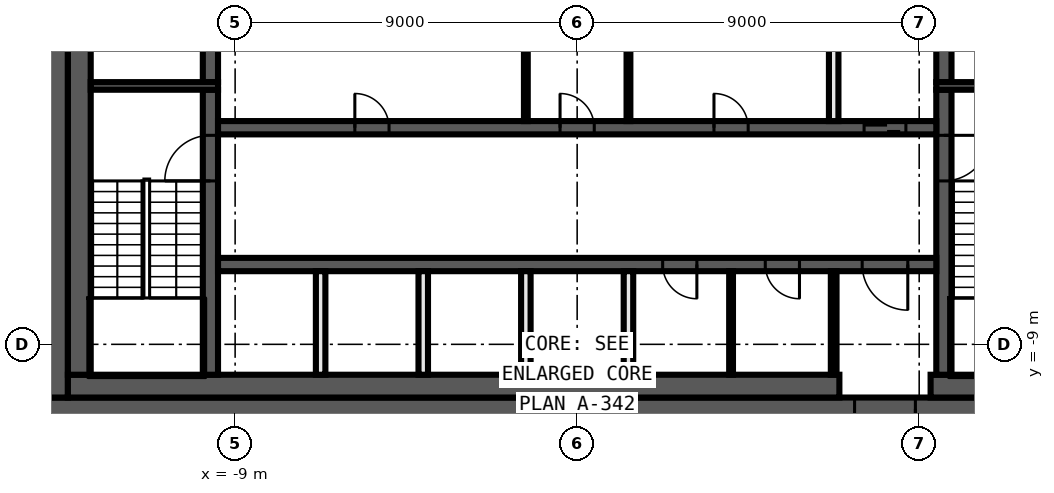
"""IFC4 building model, lengths in metres.
Left out: names, types, materials, properties, quantities, classifications, styles, units other than length and angle.
Written with IfcOpenShell. Run it as: python <this file> out.ifc"""

import sys

from ifc_helpers import new_model, si_unit, direction, frame, frame_2d, origin, place, context, subcontext, project, spatial, rectangle, extrude, element, fill, save


model = new_model("IFC4")
c1 = context("Model", 3, precision=1e-05, world=origin(), true_north=direction((0.0, 1.0)))
c2 = subcontext(c1, "Body", "Model", "MODEL_VIEW")
j1 = project(units=[si_unit("LENGTHUNIT", "METRE"), si_unit("PLANEANGLEUNIT", "RADIAN")], contexts=[c1])
p1 = place(None, origin())
s1 = spatial("IfcSite", under=j1, at=p1, CompositionType="ELEMENT")
p2 = place(p1, origin())
s2 = spatial("IfcBuilding", under=s1, at=p2, CompositionType="ELEMENT")
p3 = place(p2, frame((0.0, 0.0, 359.0)))
s3 = spatial("IfcBuildingStorey", under=s2, at=p3, CompositionType="ELEMENT", Elevation=359.0)
p4 = place(p3, frame((-11.138, 20.28, 0.0), z_axis=(0.0, 0.0, 1.0), x_axis=(-0.441342255748, -0.897338850876, 0.0)))
e1 = element("IfcWall", 1, at=p4, inside=s3, PredefinedType="SOLIDWALL", context=c2, shape_type="SweptSolid", body=[
    extrude(rectangle(XDim=28.805, YDim=0.25, at=frame_2d((14.403, 0.0))), origin(), (0.0, 0.0, 1.0), 3.8),
])
p5 = place(p3, frame((-23.851, -5.568, 0.0), z_axis=(0.0, 0.0, 1.0), x_axis=(0.701718568407, -0.712454244673, 0.0)))
e2 = element("IfcWall", 2, at=p5, inside=s3, PredefinedType="SOLIDWALL", context=c2, shape_type="SweptSolid", body=[
    extrude(rectangle(XDim=20.785, YDim=0.25, at=frame_2d((10.393, 0.0))), origin(), (0.0, 0.0, 1.0), 3.8),
])
p6 = place(p3, frame((14.0, -10.7, 0.0), z_axis=(0.0, 0.0, 1.0), x_axis=(-1.0, 0.0, 0.0)))
e3 = element("IfcWall", 3, at=p6, inside=s3, PredefinedType="SHEAR", context=c2, shape_type="SweptSolid", body=[
    extrude(rectangle(XDim=28.0, YDim=0.6, at=frame_2d((14.0, 0.0))), origin(), (0.0, 0.0, 1.0), 3.8),
])
p7 = place(p6, frame((5.1, 0.0, 0.0)))
e4 = element("IfcOpeningElement", 4, at=p7, cuts=e3, PredefinedType="OPENING", context=c2, shape_type="SweptSolid", body=[
    extrude(rectangle(XDim=1.6, YDim=2.1, at=frame_2d((0.8, 1.05))), frame((0.0, 0.31, 0.0), z_axis=(0.0, -1.0, 0.0), x_axis=(1.0, 0.0, 0.0)), (0.0, 0.0, 1.0), 0.62),
])
p8 = place(p3, frame((-13.7, -10.4, 0.0), z_axis=(0.0, 0.0, 1.0), x_axis=(0.0, 1.0, 0.0)))
e5 = element("IfcWall", 5, at=p8, inside=s3, PredefinedType="SHEAR", context=c2, shape_type="SweptSolid", body=[
    extrude(rectangle(XDim=20.8, YDim=0.6, at=frame_2d((10.4, 0.0))), origin(), (0.0, 0.0, 1.0), 3.8),
])
p9 = place(p3, frame((13.4, -10.1, 0.0), z_axis=(0.0, 0.0, 1.0), x_axis=(-1.0, 0.0, 0.0)))
e6 = element("IfcWall", 6, at=p9, inside=s3, PredefinedType="SHEAR", context=c2, shape_type="SweptSolid", body=[
    extrude(rectangle(XDim=4.1, YDim=0.6, at=frame_2d((2.05, 0.0))), origin(), (0.0, 0.0, 1.0), 3.8),
])
p10 = place(p3, frame((6.9, -10.1, 0.0), z_axis=(0.0, 0.0, 1.0), x_axis=(-1.0, 0.0, 0.0)))
e7 = element("IfcWall", 7, at=p10, inside=s3, PredefinedType="SHEAR", context=c2, shape_type="SweptSolid", body=[
    extrude(rectangle(XDim=20.3, YDim=0.6, at=frame_2d((10.15, 0.0))), origin(), (0.0, 0.0, 1.0), 3.8),
])
p11 = place(p3, frame((-13.1, -9.8, 0.0), z_axis=(0.0, 0.0, 1.0), x_axis=(0.0, 1.0, 0.0)))
e8 = element("IfcWall", 8, at=p11, inside=s3, PredefinedType="SHEAR", context=c2, shape_type="SweptSolid", body=[
    extrude(rectangle(XDim=19.6, YDim=0.6, at=frame_2d((9.8, 0.0))), origin(), (0.0, 0.0, 1.0), 3.8),
])
p12 = place(p3, frame((9.65, -2.3, 0.0), z_axis=(0.0, 0.0, 1.0), x_axis=(0.0, -1.0, 0.0)))
e9 = element("IfcWall", 9, at=p12, inside=s3, PredefinedType="SHEAR", context=c2, shape_type="SweptSolid", body=[
    extrude(rectangle(XDim=7.5, YDim=0.4, at=frame_2d((3.75, 0.0))), origin(), (0.0, 0.0, 1.0), 3.8),
])
p13 = place(p12, frame((1.2, 0.0, 0.0)))
e10 = element("IfcOpeningElement", 10, at=p13, cuts=e9, PredefinedType="OPENING", context=c2, shape_type="SweptSolid", body=[
    extrude(rectangle(XDim=1.2, YDim=2.1, at=frame_2d((0.6, 1.05))), frame((0.0, 0.21, 0.0), z_axis=(0.0, -1.0, 0.0), x_axis=(1.0, 0.0, 0.0)), (0.0, 0.0, 1.0), 0.42),
])
p14 = place(p3, frame((9.65, 2.1, 0.0), z_axis=(0.0, 0.0, 1.0), x_axis=(0.0, -1.0, 0.0)))
e11 = element("IfcWall", 11, at=p14, inside=s3, PredefinedType="SHEAR", context=c2, shape_type="SweptSolid", body=[
    extrude(rectangle(XDim=4.2, YDim=0.4, at=frame_2d((2.1, 0.0))), origin(), (0.0, 0.0, 1.0), 3.8),
])
p15 = place(p14, frame((0.15, 0.0, 0.0)))
e12 = element("IfcOpeningElement", 12, at=p15, cuts=e11, PredefinedType="OPENING", context=c2, shape_type="SweptSolid", body=[
    extrude(rectangle(XDim=0.9, YDim=2.1, at=frame_2d((0.45, 1.05))), frame((0.0, 0.21, 0.0), z_axis=(0.0, -1.0, 0.0), x_axis=(1.0, 0.0, 0.0)), (0.0, 0.0, 1.0), 0.42),
])
p16 = place(p3, frame((-9.65, -9.8, 0.0), z_axis=(0.0, 0.0, 1.0), x_axis=(0.0, 1.0, 0.0)))
e13 = element("IfcWall", 13, at=p16, inside=s3, PredefinedType="SHEAR", context=c2, shape_type="SweptSolid", body=[
    extrude(rectangle(XDim=7.5, YDim=0.4, at=frame_2d((3.75, 0.0))), origin(), (0.0, 0.0, 1.0), 3.8),
])
p17 = place(p16, frame((5.1, 0.0, 0.0)))
e14 = element("IfcOpeningElement", 14, at=p17, cuts=e13, PredefinedType="OPENING", context=c2, shape_type="SweptSolid", body=[
    extrude(rectangle(XDim=1.2, YDim=2.1, at=frame_2d((0.6, 1.05))), frame((0.0, 0.21, 0.0), z_axis=(0.0, -1.0, 0.0), x_axis=(1.0, 0.0, 0.0)), (0.0, 0.0, 1.0), 0.42),
])
p18 = place(p3, frame((-9.65, -2.1, 0.0), z_axis=(0.0, 0.0, 1.0), x_axis=(0.0, 1.0, 0.0)))
e15 = element("IfcWall", 15, at=p18, inside=s3, PredefinedType="SHEAR", context=c2, shape_type="SweptSolid", body=[
    extrude(rectangle(XDim=4.2, YDim=0.4, at=frame_2d((2.1, 0.0))), origin(), (0.0, 0.0, 1.0), 3.8),
])
for number, where, z_axis, x_axis in (
    (16, (9.45, -2.2, 0.0), (0.0, 0.0, 1.0), (1.0, 0.0, 0.0)),
    (17, (-9.45, -2.2, 0.0), (0.0, 0.0, 1.0), (-1.0, 0.0, 0.0)),
):
    element("IfcWall", number, at=place(p3, frame(where, z_axis=z_axis, x_axis=x_axis)), inside=s3, PredefinedType="SHEAR", context=c2, shape_type="SweptSolid", body=[
        extrude(rectangle(XDim=3.35, YDim=0.2, at=frame_2d((1.675, 0.0))), origin(), (0.0, 0.0, 1.0), 3.8),
    ])
p19 = place(p3, frame((-9.45, -3.3, 0.0), z_axis=(0.0, 0.0, 1.0), x_axis=(1.0, 0.0, 0.0)))
e18 = element("IfcWall", 18, at=p19, inside=s3, PredefinedType="SHEAR", context=c2, shape_type="SweptSolid", body=[
    extrude(rectangle(XDim=18.9, YDim=0.35, at=frame_2d((9.45, 0.0))), origin(), (0.0, 0.0, 1.0), 3.8),
])
p20 = place(p19, frame((17.0, 0.0, 0.0)))
e19 = element("IfcOpeningElement", 19, at=p20, cuts=e18, PredefinedType="OPENING", context=c2, shape_type="SweptSolid", body=[
    extrude(rectangle(XDim=1.1, YDim=2.1, at=frame_2d((0.55, 1.05))), frame((0.0, 0.185, 0.0), z_axis=(0.0, -1.0, 0.0), x_axis=(1.0, 0.0, 0.0)), (0.0, 0.0, 1.0), 0.37),
])
p21 = place(p19, frame((3.6, 0.0, 0.0)))
e20 = element("IfcOpeningElement", 20, at=p21, cuts=e18, PredefinedType="OPENING", context=c2, shape_type="SweptSolid", body=[
    extrude(rectangle(XDim=0.9, YDim=2.1, at=frame_2d((0.45, 1.05))), frame((0.0, 0.185, 0.0), z_axis=(0.0, -1.0, 0.0), x_axis=(1.0, 0.0, 0.0)), (0.0, 0.0, 1.0), 0.37),
])
p22 = place(p19, frame((9.0, 0.0, 0.0)))
e21 = element("IfcOpeningElement", 21, at=p22, cuts=e18, PredefinedType="OPENING", context=c2, shape_type="SweptSolid", body=[
    extrude(rectangle(XDim=0.9, YDim=2.1, at=frame_2d((0.45, 1.05))), frame((0.0, 0.185, 0.0), z_axis=(0.0, -1.0, 0.0), x_axis=(1.0, 0.0, 0.0)), (0.0, 0.0, 1.0), 0.37),
])
p23 = place(p19, frame((13.05, 0.0, 0.0)))
e22 = element("IfcOpeningElement", 22, at=p23, cuts=e18, PredefinedType="OPENING", context=c2, shape_type="SweptSolid", body=[
    extrude(rectangle(XDim=0.9, YDim=2.1, at=frame_2d((0.45, 1.05))), frame((0.0, 0.185, 0.0), z_axis=(0.0, -1.0, 0.0), x_axis=(1.0, 0.0, 0.0)), (0.0, 0.0, 1.0), 0.37),
])
p24 = place(p3, frame((9.45, -6.9, 0.0), z_axis=(0.0, 0.0, 1.0), x_axis=(-1.0, 0.0, 0.0)))
e23 = element("IfcWall", 23, at=p24, inside=s3, PredefinedType="SHEAR", context=c2, shape_type="SweptSolid", body=[
    extrude(rectangle(XDim=18.9, YDim=0.35, at=frame_2d((9.45, 0.0))), origin(), (0.0, 0.0, 1.0), 3.8),
])
p25 = place(p24, frame((0.75, 0.0, 0.0)))
e24 = element("IfcOpeningElement", 24, at=p25, cuts=e23, PredefinedType="OPENING", context=c2, shape_type="SweptSolid", body=[
    extrude(rectangle(XDim=1.2, YDim=2.1, at=frame_2d((0.6, 1.05))), frame((0.0, 0.185, 0.0), z_axis=(0.0, -1.0, 0.0), x_axis=(1.0, 0.0, 0.0)), (0.0, 0.0, 1.0), 0.37),
])
p26 = place(p24, frame((6.3, 0.0, 0.0)))
e25 = element("IfcOpeningElement", 25, at=p26, cuts=e23, PredefinedType="OPENING", context=c2, shape_type="SweptSolid", body=[
    extrude(rectangle(XDim=0.9, YDim=2.1, at=frame_2d((0.45, 1.05))), frame((0.0, 0.185, 0.0), z_axis=(0.0, -1.0, 0.0), x_axis=(1.0, 0.0, 0.0)), (0.0, 0.0, 1.0), 0.37),
])
p27 = place(p24, frame((3.6, 0.0, 0.0)))
e26 = element("IfcOpeningElement", 26, at=p27, cuts=e23, PredefinedType="OPENING", context=c2, shape_type="SweptSolid", body=[
    extrude(rectangle(XDim=0.9, YDim=2.1, at=frame_2d((0.45, 1.05))), frame((0.0, 0.185, 0.0), z_axis=(0.0, -1.0, 0.0), x_axis=(1.0, 0.0, 0.0)), (0.0, 0.0, 1.0), 0.37),
])
p28 = place(p3, frame((6.75, -9.8, 0.0), z_axis=(0.0, 0.0, 1.0), x_axis=(0.0, 1.0, 0.0)))
e27 = element("IfcWall", 27, at=p28, inside=s3, PredefinedType="PARTITIONING", context=c2, shape_type="SweptSolid", body=[
    extrude(rectangle(XDim=2.725, YDim=0.15, at=frame_2d((1.363, 0.0))), origin(), (0.0, 0.0, 1.0), 3.8),
])
p29 = place(p3, frame((6.75, -3.125, 0.0), z_axis=(0.0, 0.0, 1.0), x_axis=(0.0, 1.0, 0.0)))
e28 = element("IfcWall", 28, at=p29, inside=s3, PredefinedType="SOLIDWALL", context=c2, shape_type="SweptSolid", body=[
    extrude(rectangle(XDim=2.725, YDim=0.25, at=frame_2d((1.363, 0.0))), origin(), (0.0, 0.0, 1.0), 3.8),
])
for number, where, z_axis, x_axis in (
    (29, (4.05, -9.8, 0.0), (0.0, 0.0, 1.0), (0.0, 1.0, 0.0)),
    (30, (1.35, -3.125, 0.0), (0.0, 0.0, 1.0), (0.0, 1.0, 0.0)),
):
    element("IfcWall", number, at=place(p3, frame(where, z_axis=z_axis, x_axis=x_axis)), inside=s3, PredefinedType="PARTITIONING", context=c2, shape_type="SweptSolid", body=[
        extrude(rectangle(XDim=2.725, YDim=0.1, at=frame_2d((1.363, 0.0))), origin(), (0.0, 0.0, 1.0), 3.8),
    ])
p30 = place(p3, frame((1.35, -9.8, 0.0), z_axis=(0.0, 0.0, 1.0), x_axis=(0.0, 1.0, 0.0)))
e31 = element("IfcWall", 31, at=p30, inside=s3, PredefinedType="SOLIDWALL", context=c2, shape_type="SweptSolid", body=[
    extrude(rectangle(XDim=2.725, YDim=0.25, at=frame_2d((1.363, 0.0))), origin(), (0.0, 0.0, 1.0), 3.8),
])
p31 = place(p3, frame((-1.35, -3.125, 0.0), z_axis=(0.0, 0.0, 1.0), x_axis=(0.0, 1.0, 0.0)))
e32 = element("IfcWall", 32, at=p31, inside=s3, PredefinedType="PARTITIONING", context=c2, shape_type="SweptSolid", body=[
    extrude(rectangle(XDim=2.725, YDim=0.1, at=frame_2d((1.363, 0.0))), origin(), (0.0, 0.0, 1.0), 3.8),
])
for number, where, z_axis, x_axis in (
    (33, (-1.35, -9.8, 0.0), (0.0, 0.0, 1.0), (0.0, 1.0, 0.0)),
    (34, (-4.05, -9.8, 0.0), (0.0, 0.0, 1.0), (0.0, 1.0, 0.0)),
    (35, (-6.75, -9.8, 0.0), (0.0, 0.0, 1.0), (0.0, 1.0, 0.0)),
):
    element("IfcWall", number, at=place(p3, frame(where, z_axis=z_axis, x_axis=x_axis)), inside=s3, PredefinedType="SOLIDWALL", context=c2, shape_type="SweptSolid", body=[
        extrude(rectangle(XDim=2.725, YDim=0.25, at=frame_2d((1.363, 0.0))), origin(), (0.0, 0.0, 1.0), 3.8),
    ])
p32 = place(p20, origin())
e36 = element("IfcDoor", 36, at=p32, inside=s3, OperationType="DOUBLE_DOOR_SLIDING", PredefinedType="DOOR", context=c2, shape_type="SweptSolid", body=[
    extrude(rectangle(XDim=1.1, YDim=2.1, at=frame_2d((0.55, 1.05))), frame((0.0, 0.025, 0.0), z_axis=(0.0, -1.0, 0.0), x_axis=(1.0, 0.0, 0.0)), (0.0, 0.0, 1.0), 0.05),
])
fill(e19, e36)
p33 = place(p7, origin())
e37 = element("IfcDoor", 37, at=p33, inside=s3, OperationType="DOUBLE_DOOR_SINGLE_SWING", PredefinedType="DOOR", context=c2, shape_type="SweptSolid", body=[
    extrude(rectangle(XDim=1.6, YDim=2.1, at=frame_2d((0.8, 1.05))), frame((0.0, 0.025, 0.0), z_axis=(0.0, -1.0, 0.0), x_axis=(1.0, 0.0, 0.0)), (0.0, 0.0, 1.0), 0.05),
])
fill(e4, e37)
p34 = place(p25, origin())
e38 = element("IfcDoor", 38, at=p34, inside=s3, OperationType="SINGLE_SWING_LEFT", PredefinedType="DOOR", context=c2, shape_type="SweptSolid", body=[
    extrude(rectangle(XDim=1.2, YDim=2.1, at=frame_2d((0.6, 1.05))), frame((0.0, 0.025, 0.0), z_axis=(0.0, -1.0, 0.0), x_axis=(1.0, 0.0, 0.0)), (0.0, 0.0, 1.0), 0.05),
])
fill(e24, e38)
p35 = place(p21, origin())
e39 = element("IfcDoor", 39, at=p35, inside=s3, OperationType="SINGLE_SWING_RIGHT", PredefinedType="DOOR", context=c2, shape_type="SweptSolid", body=[
    extrude(rectangle(XDim=0.9, YDim=2.1, at=frame_2d((0.45, 1.05))), frame((0.0, 0.025, 0.0), z_axis=(0.0, -1.0, 0.0), x_axis=(1.0, 0.0, 0.0)), (0.0, 0.0, 1.0), 0.05),
])
fill(e20, e39)
p36 = place(p22, origin())
e40 = element("IfcDoor", 40, at=p36, inside=s3, OperationType="SINGLE_SWING_LEFT", PredefinedType="DOOR", context=c2, shape_type="SweptSolid", body=[
    extrude(rectangle(XDim=0.9, YDim=2.1, at=frame_2d((0.45, 1.05))), frame((0.0, 0.025, 0.0), z_axis=(0.0, -1.0, 0.0), x_axis=(1.0, 0.0, 0.0)), (0.0, 0.0, 1.0), 0.05),
])
fill(e21, e40)
p37 = place(p23, origin())
e41 = element("IfcDoor", 41, at=p37, inside=s3, OperationType="SINGLE_SWING_RIGHT", PredefinedType="DOOR", context=c2, shape_type="SweptSolid", body=[
    extrude(rectangle(XDim=0.9, YDim=2.1, at=frame_2d((0.45, 1.05))), frame((0.0, 0.025, 0.0), z_axis=(0.0, -1.0, 0.0), x_axis=(1.0, 0.0, 0.0)), (0.0, 0.0, 1.0), 0.05),
])
fill(e22, e41)
p38 = place(p26, origin())
e42 = element("IfcDoor", 42, at=p38, inside=s3, OperationType="SINGLE_SWING_LEFT", PredefinedType="DOOR", context=c2, shape_type="SweptSolid", body=[
    extrude(rectangle(XDim=0.9, YDim=2.1, at=frame_2d((0.45, 1.05))), frame((0.0, 0.025, 0.0), z_axis=(0.0, -1.0, 0.0), x_axis=(1.0, 0.0, 0.0)), (0.0, 0.0, 1.0), 0.05),
])
fill(e25, e42)
p39 = place(p27, origin())
e43 = element("IfcDoor", 43, at=p39, inside=s3, OperationType="SINGLE_SWING_RIGHT", PredefinedType="DOOR", context=c2, shape_type="SweptSolid", body=[
    extrude(rectangle(XDim=0.9, YDim=2.1, at=frame_2d((0.45, 1.05))), frame((0.0, 0.025, 0.0), z_axis=(0.0, -1.0, 0.0), x_axis=(1.0, 0.0, 0.0)), (0.0, 0.0, 1.0), 0.05),
])
fill(e26, e43)
p40 = place(p13, origin())
e44 = element("IfcDoor", 44, at=p40, inside=s3, OperationType="SINGLE_SWING_RIGHT", PredefinedType="DOOR", context=c2, shape_type="SweptSolid", body=[
    extrude(rectangle(XDim=1.2, YDim=2.1, at=frame_2d((0.6, 1.05))), frame((0.0, 0.025, 0.0), z_axis=(0.0, -1.0, 0.0), x_axis=(1.0, 0.0, 0.0)), (0.0, 0.0, 1.0), 0.05),
])
fill(e10, e44)
p41 = place(p17, origin())
e45 = element("IfcDoor", 45, at=p41, inside=s3, OperationType="SINGLE_SWING_LEFT", PredefinedType="DOOR", context=c2, shape_type="SweptSolid", body=[
    extrude(rectangle(XDim=1.2, YDim=2.1, at=frame_2d((0.6, 1.05))), frame((0.0, 0.025, 0.0), z_axis=(0.0, -1.0, 0.0), x_axis=(1.0, 0.0, 0.0)), (0.0, 0.0, 1.0), 0.05),
])
fill(e14, e45)
save(model, sys.argv[1])
